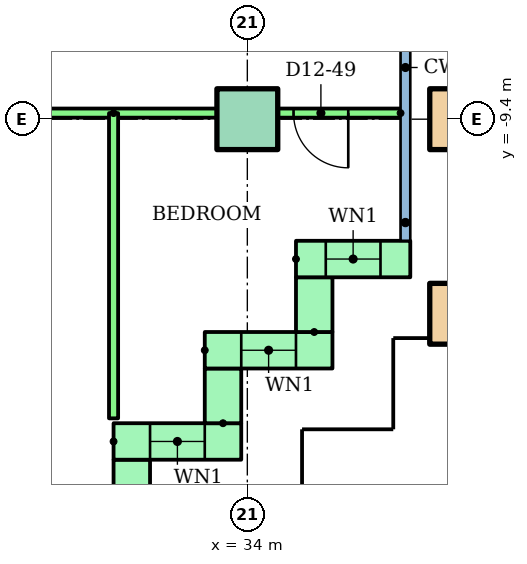
"""IFC4 building model, lengths in metres.
Left out: names, types, materials, properties, quantities, classifications, styles, units other than length and angle.
Written with IfcOpenShell. Run it as: python <this file> out.ifc"""

import sys

from ifc_helpers import new_model, si_unit, direction, frame, frame_2d, origin, origin_2d, place, context, subcontext, project, spatial, rectangle, hollow_rectangle, extrude, element, fill, save


model = new_model("IFC4")
c1 = context("Model", 3, precision=1e-05, world=origin(), true_north=direction((0.0, 1.0)))
c2 = subcontext(c1, "Body", "Model", "MODEL_VIEW")
j1 = project(units=[si_unit("LENGTHUNIT", "METRE"), si_unit("PLANEANGLEUNIT", "RADIAN")], contexts=[c1])
p1 = place(None, origin())
s1 = spatial("IfcSite", under=j1, at=p1, CompositionType="ELEMENT")
p2 = place(p1, origin())
s2 = spatial("IfcBuilding", under=s1, at=p2, CompositionType="ELEMENT")
p3 = place(p2, frame((0.0, 0.0, 48.0)))
s3 = spatial("IfcBuildingStorey", under=s2, at=p3, CompositionType="ELEMENT", Elevation=48.0)
p4 = place(p3, frame((37.5, -12.6, 0.0)))
e1 = element("IfcColumn", 1, at=p4, inside=s3, PredefinedType="COLUMN", context=c2, shape_type="SweptSolid", body=[
    extrude(hollow_rectangle(XDim=1.0, YDim=1.0, WallThickness=0.05, at=origin_2d()), origin(), (0.0, 0.0, 1.0), 3.2),
])
p5 = place(p3, frame((34.0, -9.4, 0.0)))
e2 = element("IfcColumn", 2, at=p5, inside=s3, PredefinedType="COLUMN", context=c2, shape_type="SweptSolid", body=[
    extrude(rectangle(XDim=1.0, YDim=1.0, at=origin_2d()), origin(), (0.0, 0.0, 1.0), 3.2),
])
p6 = place(p3, frame((37.5, -9.4, 0.0)))
e3 = element("IfcColumn", 3, at=p6, inside=s3, PredefinedType="COLUMN", context=c2, shape_type="SweptSolid", body=[
    extrude(hollow_rectangle(XDim=1.0, YDim=1.0, WallThickness=0.05, at=origin_2d()), origin(), (0.0, 0.0, 1.0), 3.2),
])
p7 = place(p3, frame((32.1, -16.28, 0.0), z_axis=(0.0, 0.0, 1.0), x_axis=(0.0, 1.0, 0.0)))
e4 = element("IfcWall", 4, at=p7, inside=s3, PredefinedType="STANDARD", context=c2, shape_type="SweptSolid", body=[
    extrude(rectangle(XDim=1.28, YDim=0.6, at=frame_2d((0.64, 0.0))), origin(), (0.0, 0.0, 1.0), 2.92),
])
p8 = place(p3, frame((31.8, -14.7, 0.0)))
e5 = element("IfcWall", 5, at=p8, inside=s3, PredefinedType="STANDARD", context=c2, shape_type="SweptSolid", body=[
    extrude(rectangle(XDim=2.1, YDim=0.6, at=frame_2d((1.05, 0.0))), origin(), (0.0, 0.0, 1.0), 2.92),
])
p9 = place(p8, frame((0.6, 0.0, 0.9)))
e6 = element("IfcOpeningElement", 6, at=p9, cuts=e5, PredefinedType="OPENING", context=c2, shape_type="SweptSolid", body=[
    extrude(rectangle(XDim=0.9, YDim=1.5, at=frame_2d((0.45, 0.75))), frame((0.0, 0.31, 0.0), z_axis=(0.0, -1.0, 0.0), x_axis=(1.0, 0.0, 0.0)), (0.0, 0.0, 1.0), 0.62),
])
p10 = place(p3, frame((33.6, -14.4, 0.0), z_axis=(0.0, 0.0, 1.0), x_axis=(0.0, 1.0, 0.0)))
e7 = element("IfcWall", 7, at=p10, inside=s3, PredefinedType="STANDARD", context=c2, shape_type="SweptSolid", body=[
    extrude(rectangle(XDim=0.9, YDim=0.6, at=frame_2d((0.45, 0.0))), origin(), (0.0, 0.0, 1.0), 2.92),
])
p11 = place(p3, frame((33.3, -13.2, 0.0)))
e8 = element("IfcWall", 8, at=p11, inside=s3, PredefinedType="STANDARD", context=c2, shape_type="SweptSolid", body=[
    extrude(rectangle(XDim=2.1, YDim=0.6, at=frame_2d((1.05, 0.0))), origin(), (0.0, 0.0, 1.0), 2.92),
])
p12 = place(p11, frame((0.6, 0.0, 0.9)))
e9 = element("IfcOpeningElement", 9, at=p12, cuts=e8, PredefinedType="OPENING", context=c2, shape_type="SweptSolid", body=[
    extrude(rectangle(XDim=0.9, YDim=1.5, at=frame_2d((0.45, 0.75))), frame((0.0, 0.31, 0.0), z_axis=(0.0, -1.0, 0.0), x_axis=(1.0, 0.0, 0.0)), (0.0, 0.0, 1.0), 0.62),
])
p13 = place(p3, frame((35.1, -12.9, 0.0), z_axis=(0.0, 0.0, 1.0), x_axis=(0.0, 1.0, 0.0)))
e10 = element("IfcWall", 10, at=p13, inside=s3, PredefinedType="STANDARD", context=c2, shape_type="SweptSolid", body=[
    extrude(rectangle(XDim=0.9, YDim=0.6, at=frame_2d((0.45, 0.0))), origin(), (0.0, 0.0, 1.0), 2.92),
])
p14 = place(p3, frame((34.8, -11.7, 0.0)))
e11 = element("IfcWall", 11, at=p14, inside=s3, PredefinedType="STANDARD", context=c2, shape_type="SweptSolid", body=[
    extrude(rectangle(XDim=1.88, YDim=0.6, at=frame_2d((0.94, 0.0))), origin(), (0.0, 0.0, 1.0), 2.92),
])
p15 = place(p14, frame((0.49, 0.0, 0.9)))
e12 = element("IfcOpeningElement", 12, at=p15, cuts=e11, PredefinedType="OPENING", context=c2, shape_type="SweptSolid", body=[
    extrude(rectangle(XDim=0.9, YDim=1.5, at=frame_2d((0.45, 0.75))), frame((0.0, 0.31, 0.0), z_axis=(0.0, -1.0, 0.0), x_axis=(1.0, 0.0, 0.0)), (0.0, 0.0, 1.0), 0.62),
])
p16 = place(p3, frame((36.52, -9.3, 0.0), z_axis=(0.0, 0.0, 1.0), x_axis=(-1.0, 0.0, 0.0)))
e13 = element("IfcWall", 13, at=p16, inside=s3, PredefinedType="PARTITIONING", context=c2, shape_type="SweptSolid", body=[
    extrude(rectangle(XDim=18.52, YDim=0.15, at=frame_2d((9.26, 0.0))), origin(), (0.0, 0.0, 1.0), 2.4),
])
p17 = place(p16, frame((14.02, 0.0, 0.0)))
e14 = element("IfcOpeningElement", 14, at=p17, cuts=e13, PredefinedType="OPENING", context=c2, shape_type="SweptSolid", body=[
    extrude(rectangle(XDim=1.0, YDim=2.1, at=frame_2d((0.5, 1.05))), frame((0.0, 0.085, 0.0), z_axis=(0.0, -1.0, 0.0), x_axis=(1.0, 0.0, 0.0)), (0.0, 0.0, 1.0), 0.17),
])
p18 = place(p16, frame((7.17, 0.0, 0.0)))
e15 = element("IfcOpeningElement", 15, at=p18, cuts=e13, PredefinedType="OPENING", context=c2, shape_type="SweptSolid", body=[
    extrude(rectangle(XDim=0.9, YDim=2.1, at=frame_2d((0.45, 1.05))), frame((0.0, 0.085, 0.0), z_axis=(0.0, -1.0, 0.0), x_axis=(1.0, 0.0, 0.0)), (0.0, 0.0, 1.0), 0.17),
])
p19 = place(p16, frame((0.86, 0.0, 0.0)))
e16 = element("IfcOpeningElement", 16, at=p19, cuts=e13, PredefinedType="OPENING", context=c2, shape_type="SweptSolid", body=[
    extrude(rectangle(XDim=0.9, YDim=2.1, at=frame_2d((0.45, 1.05))), frame((0.0, 0.085, 0.0), z_axis=(0.0, -1.0, 0.0), x_axis=(1.0, 0.0, 0.0)), (0.0, 0.0, 1.0), 0.17),
])
p20 = place(p3, frame((31.8, -9.3, 0.0), z_axis=(0.0, 0.0, 1.0), x_axis=(0.0, -1.0, 0.0)))
e17 = element("IfcWall", 17, at=p20, inside=s3, PredefinedType="PARTITIONING", context=c2, shape_type="SweptSolid", body=[
    extrude(rectangle(XDim=5.02, YDim=0.15, at=frame_2d((2.51, 0.0))), origin(), (0.0, 0.0, 1.0), 2.4),
])
p21 = place(p9, origin())
e18 = element("IfcWindow", 18, at=p21, inside=s3, PartitioningType="SINGLE_PANEL", PredefinedType="WINDOW", context=c2, shape_type="SweptSolid", body=[
    extrude(rectangle(XDim=0.9, YDim=1.5, at=frame_2d((0.45, 0.75))), frame((0.0, 0.03, 0.0), z_axis=(0.0, -1.0, 0.0), x_axis=(1.0, 0.0, 0.0)), (0.0, 0.0, 1.0), 0.06),
])
fill(e6, e18)
p22 = place(p12, origin())
e19 = element("IfcWindow", 19, at=p22, inside=s3, PartitioningType="SINGLE_PANEL", PredefinedType="WINDOW", context=c2, shape_type="SweptSolid", body=[
    extrude(rectangle(XDim=0.9, YDim=1.5, at=frame_2d((0.45, 0.75))), frame((0.0, 0.03, 0.0), z_axis=(0.0, -1.0, 0.0), x_axis=(1.0, 0.0, 0.0)), (0.0, 0.0, 1.0), 0.06),
])
fill(e9, e19)
p23 = place(p15, origin())
e20 = element("IfcWindow", 20, at=p23, inside=s3, PartitioningType="SINGLE_PANEL", PredefinedType="WINDOW", context=c2, shape_type="SweptSolid", body=[
    extrude(rectangle(XDim=0.9, YDim=1.5, at=frame_2d((0.45, 0.75))), frame((0.0, 0.03, 0.0), z_axis=(0.0, -1.0, 0.0), x_axis=(1.0, 0.0, 0.0)), (0.0, 0.0, 1.0), 0.06),
])
fill(e12, e20)
p24 = place(p19, origin())
e21 = element("IfcDoor", 21, at=p24, inside=s3, OperationType="SINGLE_SWING_LEFT", PredefinedType="DOOR", context=c2, shape_type="SweptSolid", body=[
    extrude(rectangle(XDim=0.9, YDim=2.1, at=frame_2d((0.45, 1.05))), frame((0.0, 0.025, 0.0), z_axis=(0.0, -1.0, 0.0), x_axis=(1.0, 0.0, 0.0)), (0.0, 0.0, 1.0), 0.05),
])
fill(e16, e21)
save(model, sys.argv[1])
